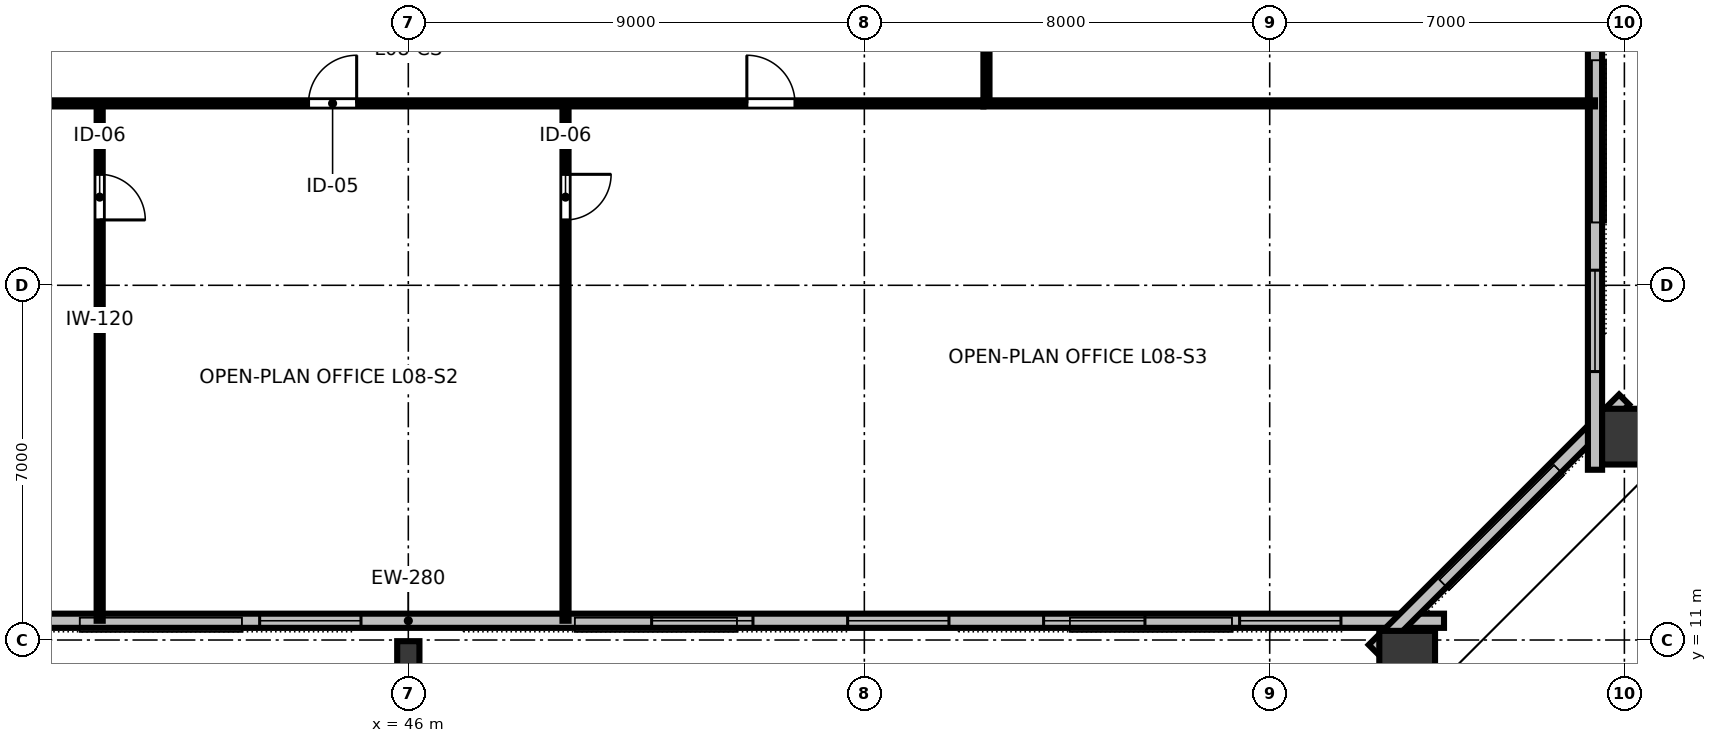
"""IFC4 building model, lengths in metres.
Left out: names, types, materials, properties, quantities, classifications, styles, units other than length and angle.
Written with IfcOpenShell. Run it as: python <this file> out.ifc"""

import sys

from ifc_helpers import new_model, si_unit, direction, frame, frame_2d, origin, origin_2d, place, context, subcontext, project, spatial, rectangle, hollow_rectangle, i_section, extrude, element, fill, save


model = new_model("IFC4")
c1 = context("Model", 3, precision=1e-05, world=origin(), true_north=direction((0.0, 1.0)))
c2 = subcontext(c1, "Body", "Model", "MODEL_VIEW")
j1 = project(units=[si_unit("LENGTHUNIT", "METRE"), si_unit("PLANEANGLEUNIT", "RADIAN")], contexts=[c1])
p1 = place(None, origin())
s1 = spatial("IfcSite", under=j1, at=p1, CompositionType="ELEMENT")
p2 = place(p1, origin())
s2 = spatial("IfcBuilding", under=s1, at=p2, CompositionType="ELEMENT")
p3 = place(p2, frame((0.0, 0.0, 35.2)))
s3 = spatial("IfcBuildingStorey", under=s2, at=p3, CompositionType="ELEMENT", Elevation=35.2)
p4 = place(p3, frame((46.0, 10.72, 0.0), z_axis=(0.0, -0.094885603902, 0.995488182839), x_axis=(1.0, 0.0, 0.0)))
e1 = element("IfcColumn", 1, at=p4, inside=s3, PredefinedType="COLUMN", context=c2, shape_type="SweptSolid", body=[
    extrude(i_section(OverallWidth=0.439, OverallDepth=0.514, WebThickness=0.06, FlangeThickness=0.097, FilletRadius=0.025, at=origin_2d()), origin(), (0.0, 0.0, 1.0), 3.162),
])
p5 = place(p3, frame((65.713, 10.531, 0.0), z_axis=(0.047968316961, -0.09439424431, 0.994378583442), x_axis=(0.891494829719, 0.453030869351, 0.0)))
e2 = element("IfcColumn", 2, at=p5, inside=s3, PredefinedType="COLUMN", context=c2, shape_type="SweptSolid", body=[
    extrude(hollow_rectangle(XDim=1.1, YDim=1.3, WallThickness=0.07, at=origin_2d()), origin(), (0.0, 0.0, 1.0), 3.166),
])
p6 = place(p3, frame((70.211, 15.013, 0.0), z_axis=(0.10994269781, -0.032281703141, 0.993413556803), x_axis=(-0.953174231432, 0.279873863329, 0.114584052814)))
e3 = element("IfcColumn", 3, at=p6, inside=s3, PredefinedType="COLUMN", context=c2, shape_type="SweptSolid", body=[
    extrude(hollow_rectangle(XDim=1.1, YDim=1.3, WallThickness=0.07, at=origin_2d()), origin(), (0.0, 0.0, 1.0), 3.169),
])
p7 = place(p3, frame((25.56, 11.38, 0.0), z_axis=(0.0, 0.0, 1.0), x_axis=(1.0, 0.0, 0.0)))
e4 = element("IfcWall", 4, at=p7, inside=s3, PredefinedType="STANDARD", context=c2, shape_type="SweptSolid", body=[
    extrude(rectangle(XDim=40.88, YDim=0.28, at=frame_2d((20.44, 0.0))), origin(), (0.0, 0.0, 1.0), 3.15),
])
p8 = place(p7, frame((2.034, 0.0, 0.8)))
e5 = element("IfcOpeningElement", 5, at=p8, cuts=e4, PredefinedType="OPENING", context=c2, shape_type="SweptSolid", body=[
    extrude(rectangle(XDim=2.0, YDim=1.95, at=frame_2d((1.0, 0.975))), frame((0.0, 0.15, 0.0), z_axis=(0.0, -1.0, 0.0), x_axis=(1.0, 0.0, 0.0)), (0.0, 0.0, 1.0), 0.3),
])
p9 = place(p7, frame((5.902, 0.0, 0.8)))
e6 = element("IfcOpeningElement", 6, at=p9, cuts=e4, PredefinedType="OPENING", context=c2, shape_type="SweptSolid", body=[
    extrude(rectangle(XDim=2.0, YDim=1.95, at=frame_2d((1.0, 0.975))), frame((0.0, 0.15, 0.0), z_axis=(0.0, -1.0, 0.0), x_axis=(1.0, 0.0, 0.0)), (0.0, 0.0, 1.0), 0.3),
])
p10 = place(p7, frame((9.77, 0.0, 0.8)))
e7 = element("IfcOpeningElement", 7, at=p10, cuts=e4, PredefinedType="OPENING", context=c2, shape_type="SweptSolid", body=[
    extrude(rectangle(XDim=2.0, YDim=1.95, at=frame_2d((1.0, 0.975))), frame((0.0, 0.15, 0.0), z_axis=(0.0, -1.0, 0.0), x_axis=(1.0, 0.0, 0.0)), (0.0, 0.0, 1.0), 0.3),
])
p11 = place(p7, frame((17.506, 0.0, 0.8)))
e8 = element("IfcOpeningElement", 8, at=p11, cuts=e4, PredefinedType="OPENING", context=c2, shape_type="SweptSolid", body=[
    extrude(rectangle(XDim=2.0, YDim=1.95, at=frame_2d((1.0, 0.975))), frame((0.0, 0.15, 0.0), z_axis=(0.0, -1.0, 0.0), x_axis=(1.0, 0.0, 0.0)), (0.0, 0.0, 1.0), 0.3),
])
p12 = place(p7, frame((25.242, 0.0, 0.8)))
e9 = element("IfcOpeningElement", 9, at=p12, cuts=e4, PredefinedType="OPENING", context=c2, shape_type="SweptSolid", body=[
    extrude(rectangle(XDim=2.0, YDim=1.95, at=frame_2d((1.0, 0.975))), frame((0.0, 0.15, 0.0), z_axis=(0.0, -1.0, 0.0), x_axis=(1.0, 0.0, 0.0)), (0.0, 0.0, 1.0), 0.3),
])
p13 = place(p7, frame((29.11, 0.0, 0.8)))
e10 = element("IfcOpeningElement", 10, at=p13, cuts=e4, PredefinedType="OPENING", context=c2, shape_type="SweptSolid", body=[
    extrude(rectangle(XDim=2.0, YDim=1.95, at=frame_2d((1.0, 0.975))), frame((0.0, 0.15, 0.0), z_axis=(0.0, -1.0, 0.0), x_axis=(1.0, 0.0, 0.0)), (0.0, 0.0, 1.0), 0.3),
])
p14 = place(p7, frame((32.978, 0.0, 0.8)))
e11 = element("IfcOpeningElement", 11, at=p14, cuts=e4, PredefinedType="OPENING", context=c2, shape_type="SweptSolid", body=[
    extrude(rectangle(XDim=2.0, YDim=1.95, at=frame_2d((1.0, 0.975))), frame((0.0, 0.15, 0.0), z_axis=(0.0, -1.0, 0.0), x_axis=(1.0, 0.0, 0.0)), (0.0, 0.0, 1.0), 0.3),
])
p15 = place(p7, frame((36.846, 0.0, 0.8)))
e12 = element("IfcOpeningElement", 12, at=p15, cuts=e4, PredefinedType="OPENING", context=c2, shape_type="SweptSolid", body=[
    extrude(rectangle(XDim=2.0, YDim=1.95, at=frame_2d((1.0, 0.975))), frame((0.0, 0.15, 0.0), z_axis=(0.0, -1.0, 0.0), x_axis=(1.0, 0.0, 0.0)), (0.0, 0.0, 1.0), 0.3),
])
p16 = place(p3, frame((65.054, 10.806, 0.0), z_axis=(0.0, 0.0, 1.0), x_axis=(0.707106781187, 0.707106781187, 0.0)))
e13 = element("IfcWall", 13, at=p16, inside=s3, PredefinedType="STANDARD", context=c2, shape_type="SweptSolid", body=[
    extrude(rectangle(XDim=6.985, YDim=0.28, at=frame_2d((3.493, 0.0))), origin(), (0.0, 0.0, 1.0), 3.15),
])
p17 = place(p3, frame((69.42, 14.36, 0.0), z_axis=(0.0, 0.0, 1.0), x_axis=(0.0, 1.0, 0.0)))
e14 = element("IfcWall", 14, at=p17, inside=s3, PredefinedType="STANDARD", context=c2, shape_type="SweptSolid", body=[
    extrude(rectangle(XDim=35.28, YDim=0.28, at=frame_2d((17.64, 0.0))), origin(), (0.0, 0.0, 1.0), 3.15),
])
p18 = place(p17, frame((1.938, 0.0, 0.8)))
e15 = element("IfcOpeningElement", 15, at=p18, cuts=e14, PredefinedType="OPENING", context=c2, shape_type="SweptSolid", body=[
    extrude(rectangle(XDim=2.0, YDim=1.95, at=frame_2d((1.0, 0.975))), frame((0.0, 0.15, 0.0), z_axis=(0.0, -1.0, 0.0), x_axis=(1.0, 0.0, 0.0)), (0.0, 0.0, 1.0), 0.3),
])
p19 = place(p17, frame((9.289, 0.0, 0.8)))
e16 = element("IfcOpeningElement", 16, at=p19, cuts=e14, PredefinedType="OPENING", context=c2, shape_type="SweptSolid", body=[
    extrude(rectangle(XDim=2.0, YDim=1.95, at=frame_2d((1.0, 0.975))), frame((0.0, 0.15, 0.0), z_axis=(0.0, -1.0, 0.0), x_axis=(1.0, 0.0, 0.0)), (0.0, 0.0, 1.0), 0.3),
])
p20 = place(p17, frame((12.964, 0.0, 0.8)))
e17 = element("IfcOpeningElement", 17, at=p20, cuts=e14, PredefinedType="OPENING", context=c2, shape_type="SweptSolid", body=[
    extrude(rectangle(XDim=2.0, YDim=1.95, at=frame_2d((1.0, 0.975))), frame((0.0, 0.15, 0.0), z_axis=(0.0, -1.0, 0.0), x_axis=(1.0, 0.0, 0.0)), (0.0, 0.0, 1.0), 0.3),
])
p21 = place(p17, frame((20.316, 0.0, 0.8)))
e18 = element("IfcOpeningElement", 18, at=p21, cuts=e14, PredefinedType="OPENING", context=c2, shape_type="SweptSolid", body=[
    extrude(rectangle(XDim=2.0, YDim=1.95, at=frame_2d((1.0, 0.975))), frame((0.0, 0.15, 0.0), z_axis=(0.0, -1.0, 0.0), x_axis=(1.0, 0.0, 0.0)), (0.0, 0.0, 1.0), 0.3),
])
p22 = place(p17, frame((23.991, 0.0, 0.8)))
e19 = element("IfcOpeningElement", 19, at=p22, cuts=e14, PredefinedType="OPENING", context=c2, shape_type="SweptSolid", body=[
    extrude(rectangle(XDim=2.0, YDim=1.95, at=frame_2d((1.0, 0.975))), frame((0.0, 0.15, 0.0), z_axis=(0.0, -1.0, 0.0), x_axis=(1.0, 0.0, 0.0)), (0.0, 0.0, 1.0), 0.3),
])
p23 = place(p17, frame((31.342, 0.0, 0.8)))
e20 = element("IfcOpeningElement", 20, at=p23, cuts=e14, PredefinedType="OPENING", context=c2, shape_type="SweptSolid", body=[
    extrude(rectangle(XDim=2.0, YDim=1.95, at=frame_2d((1.0, 0.975))), frame((0.0, 0.15, 0.0), z_axis=(0.0, -1.0, 0.0), x_axis=(1.0, 0.0, 0.0)), (0.0, 0.0, 1.0), 0.3),
])
p24 = place(p3, frame((39.909, 21.59, 0.0), z_axis=(0.0, 0.0, 1.0), x_axis=(0.0, -1.0, 0.0)))
e21 = element("IfcWall", 21, at=p24, inside=s3, PredefinedType="PARTITIONING", context=c2, shape_type="SweptSolid", body=[
    extrude(rectangle(XDim=10.21, YDim=0.12, at=frame_2d((5.105, 0.0))), origin(), (0.0, 0.0, 1.0), 2.43),
])
p25 = place(p24, frame((1.4, 0.0, 0.0)))
e22 = element("IfcOpeningElement", 22, at=p25, cuts=e21, PredefinedType="OPENING", context=c2, shape_type="SweptSolid", body=[
    extrude(rectangle(XDim=0.9, YDim=2.15, at=frame_2d((0.45, 1.075))), frame((0.0, 0.07, 0.0), z_axis=(0.0, -1.0, 0.0), x_axis=(1.0, 0.0, 0.0)), (0.0, 0.0, 1.0), 0.14),
])
p26 = place(p3, frame((49.102, 21.59, 0.0), z_axis=(0.0, 0.0, 1.0), x_axis=(0.0, -1.0, 0.0)))
e23 = element("IfcWall", 23, at=p26, inside=s3, PredefinedType="PARTITIONING", context=c2, shape_type="SweptSolid", body=[
    extrude(rectangle(XDim=10.21, YDim=0.12, at=frame_2d((5.105, 0.0))), origin(), (0.0, 0.0, 1.0), 2.43),
])
p27 = place(p26, frame((1.4, 0.0, 0.0)))
e24 = element("IfcOpeningElement", 24, at=p27, cuts=e23, PredefinedType="OPENING", context=c2, shape_type="SweptSolid", body=[
    extrude(rectangle(XDim=0.9, YDim=2.15, at=frame_2d((0.45, 1.075))), frame((0.0, 0.07, 0.0), z_axis=(0.0, -1.0, 0.0), x_axis=(1.0, 0.0, 0.0)), (0.0, 0.0, 1.0), 0.14),
])
p28 = place(p3, frame((34.65, 21.59, 0.0), z_axis=(0.0, 0.0, 1.0), x_axis=(1.0, 0.0, 0.0)))
e25 = element("IfcWall", 25, at=p28, inside=s3, PredefinedType="PARTITIONING", context=c2, shape_type="SweptSolid", body=[
    extrude(rectangle(XDim=22.7, YDim=0.12, at=frame_2d((11.35, 0.0))), origin(), (0.0, 0.0, 1.0), 2.43),
])
p29 = place(p28, frame((2.224, 0.0, 0.0)))
e26 = element("IfcOpeningElement", 26, at=p29, cuts=e25, PredefinedType="OPENING", context=c2, shape_type="SweptSolid", body=[
    extrude(rectangle(XDim=0.95, YDim=2.15, at=frame_2d((0.475, 1.075))), frame((0.0, 0.07, 0.0), z_axis=(0.0, -1.0, 0.0), x_axis=(1.0, 0.0, 0.0)), (0.0, 0.0, 1.0), 0.14),
])
p30 = place(p28, frame((9.381, 0.0, 0.0)))
e27 = element("IfcOpeningElement", 27, at=p30, cuts=e25, PredefinedType="OPENING", context=c2, shape_type="SweptSolid", body=[
    extrude(rectangle(XDim=0.95, YDim=2.15, at=frame_2d((0.475, 1.075))), frame((0.0, 0.07, 0.0), z_axis=(0.0, -1.0, 0.0), x_axis=(1.0, 0.0, 0.0)), (0.0, 0.0, 1.0), 0.14),
])
p31 = place(p28, frame((18.031, 0.0, 0.0)))
e28 = element("IfcOpeningElement", 28, at=p31, cuts=e25, PredefinedType="OPENING", context=c2, shape_type="SweptSolid", body=[
    extrude(rectangle(XDim=0.95, YDim=2.15, at=frame_2d((0.475, 1.075))), frame((0.0, 0.07, 0.0), z_axis=(0.0, -1.0, 0.0), x_axis=(1.0, 0.0, 0.0)), (0.0, 0.0, 1.0), 0.14),
])
p32 = place(p3, frame((57.41, 21.65, 0.0), z_axis=(0.0, 0.0, 1.0), x_axis=(0.0, 1.0, 0.0)))
e29 = element("IfcWall", 29, at=p32, inside=s3, PredefinedType="PARTITIONING", context=c2, shape_type="SweptSolid", body=[
    extrude(rectangle(XDim=20.7, YDim=0.12, at=frame_2d((10.35, 0.0))), origin(), (0.0, 0.0, 1.0), 2.43),
])
p33 = place(p32, frame((5.31, 0.0, 0.0)))
e30 = element("IfcOpeningElement", 30, at=p33, cuts=e29, PredefinedType="OPENING", context=c2, shape_type="SweptSolid", body=[
    extrude(rectangle(XDim=0.95, YDim=2.15, at=frame_2d((0.475, 1.075))), frame((0.0, 0.07, 0.0), z_axis=(0.0, -1.0, 0.0), x_axis=(1.0, 0.0, 0.0)), (0.0, 0.0, 1.0), 0.14),
])
p34 = place(p32, frame((15.459, 0.0, 0.0)))
e31 = element("IfcOpeningElement", 31, at=p34, cuts=e29, PredefinedType="OPENING", context=c2, shape_type="SweptSolid", body=[
    extrude(rectangle(XDim=0.95, YDim=2.15, at=frame_2d((0.475, 1.075))), frame((0.0, 0.07, 0.0), z_axis=(0.0, -1.0, 0.0), x_axis=(1.0, 0.0, 0.0)), (0.0, 0.0, 1.0), 0.14),
])
p35 = place(p3, frame((57.35, 21.59, 0.0), z_axis=(0.0, 0.0, 1.0), x_axis=(1.0, 0.0, 0.0)))
e32 = element("IfcWall", 32, at=p35, inside=s3, PredefinedType="PARTITIONING", context=c2, shape_type="SweptSolid", body=[
    extrude(rectangle(XDim=12.07, YDim=0.12, at=frame_2d((6.035, 0.0))), origin(), (0.0, 0.0, 1.0), 2.43),
])
p36 = place(p11, origin())
e33 = element("IfcWindow", 33, at=p36, inside=s3, PartitioningType="SINGLE_PANEL", PredefinedType="WINDOW", context=c2, shape_type="SweptSolid", body=[
    extrude(rectangle(XDim=2.0, YDim=1.95, at=frame_2d((1.0, 0.975))), frame((0.0, 0.03, 0.0), z_axis=(0.0, -1.0, 0.0), x_axis=(1.0, 0.0, 0.0)), (0.0, 0.0, 1.0), 0.06),
])
fill(e8, e33)
p37 = place(p12, origin())
e34 = element("IfcWindow", 34, at=p37, inside=s3, PartitioningType="SINGLE_PANEL", PredefinedType="WINDOW", context=c2, shape_type="SweptSolid", body=[
    extrude(rectangle(XDim=2.0, YDim=1.95, at=frame_2d((1.0, 0.975))), frame((0.0, 0.03, 0.0), z_axis=(0.0, -1.0, 0.0), x_axis=(1.0, 0.0, 0.0)), (0.0, 0.0, 1.0), 0.06),
])
fill(e9, e34)
p38 = place(p13, origin())
e35 = element("IfcWindow", 35, at=p38, inside=s3, PartitioningType="SINGLE_PANEL", PredefinedType="WINDOW", context=c2, shape_type="SweptSolid", body=[
    extrude(rectangle(XDim=2.0, YDim=1.95, at=frame_2d((1.0, 0.975))), frame((0.0, 0.03, 0.0), z_axis=(0.0, -1.0, 0.0), x_axis=(1.0, 0.0, 0.0)), (0.0, 0.0, 1.0), 0.06),
])
fill(e10, e35)
p39 = place(p14, origin())
e36 = element("IfcWindow", 36, at=p39, inside=s3, PartitioningType="SINGLE_PANEL", PredefinedType="WINDOW", context=c2, shape_type="SweptSolid", body=[
    extrude(rectangle(XDim=2.0, YDim=1.95, at=frame_2d((1.0, 0.975))), frame((0.0, 0.03, 0.0), z_axis=(0.0, -1.0, 0.0), x_axis=(1.0, 0.0, 0.0)), (0.0, 0.0, 1.0), 0.06),
])
fill(e11, e36)
p40 = place(p15, origin())
e37 = element("IfcWindow", 37, at=p40, inside=s3, PartitioningType="SINGLE_PANEL", PredefinedType="WINDOW", context=c2, shape_type="SweptSolid", body=[
    extrude(rectangle(XDim=2.0, YDim=1.95, at=frame_2d((1.0, 0.975))), frame((0.0, 0.03, 0.0), z_axis=(0.0, -1.0, 0.0), x_axis=(1.0, 0.0, 0.0)), (0.0, 0.0, 1.0), 0.06),
])
fill(e12, e37)
p41 = place(p18, origin())
e38 = element("IfcWindow", 38, at=p41, inside=s3, PartitioningType="SINGLE_PANEL", PredefinedType="WINDOW", context=c2, shape_type="SweptSolid", body=[
    extrude(rectangle(XDim=2.0, YDim=1.95, at=frame_2d((1.0, 0.975))), frame((0.0, 0.03, 0.0), z_axis=(0.0, -1.0, 0.0), x_axis=(1.0, 0.0, 0.0)), (0.0, 0.0, 1.0), 0.06),
])
fill(e15, e38)
p42 = place(p25, origin())
e39 = element("IfcDoor", 39, at=p42, inside=s3, OperationType="SINGLE_SWING_RIGHT", PredefinedType="DOOR", context=c2, shape_type="SweptSolid", body=[
    extrude(rectangle(XDim=0.9, YDim=2.15, at=frame_2d((0.45, 1.075))), frame((0.0, 0.025, 0.0), z_axis=(0.0, -1.0, 0.0), x_axis=(1.0, 0.0, 0.0)), (0.0, 0.0, 1.0), 0.05),
])
fill(e22, e39)
p43 = place(p27, origin())
e40 = element("IfcDoor", 40, at=p43, inside=s3, OperationType="SINGLE_SWING_LEFT", PredefinedType="DOOR", context=c2, shape_type="SweptSolid", body=[
    extrude(rectangle(XDim=0.9, YDim=2.15, at=frame_2d((0.45, 1.075))), frame((0.0, 0.025, 0.0), z_axis=(0.0, -1.0, 0.0), x_axis=(1.0, 0.0, 0.0)), (0.0, 0.0, 1.0), 0.05),
])
fill(e24, e40)
p44 = place(p30, origin())
e41 = element("IfcDoor", 41, at=p44, inside=s3, OperationType="SINGLE_SWING_RIGHT", PredefinedType="DOOR", context=c2, shape_type="SweptSolid", body=[
    extrude(rectangle(XDim=0.95, YDim=2.15, at=frame_2d((0.475, 1.075))), frame((0.0, 0.025, 0.0), z_axis=(0.0, -1.0, 0.0), x_axis=(1.0, 0.0, 0.0)), (0.0, 0.0, 1.0), 0.05),
])
fill(e27, e41)
p45 = place(p31, origin())
e42 = element("IfcDoor", 42, at=p45, inside=s3, OperationType="SINGLE_SWING_LEFT", PredefinedType="DOOR", context=c2, shape_type="SweptSolid", body=[
    extrude(rectangle(XDim=0.95, YDim=2.15, at=frame_2d((0.475, 1.075))), frame((0.0, 0.025, 0.0), z_axis=(0.0, -1.0, 0.0), x_axis=(1.0, 0.0, 0.0)), (0.0, 0.0, 1.0), 0.05),
])
fill(e28, e42)
save(model, sys.argv[1])
